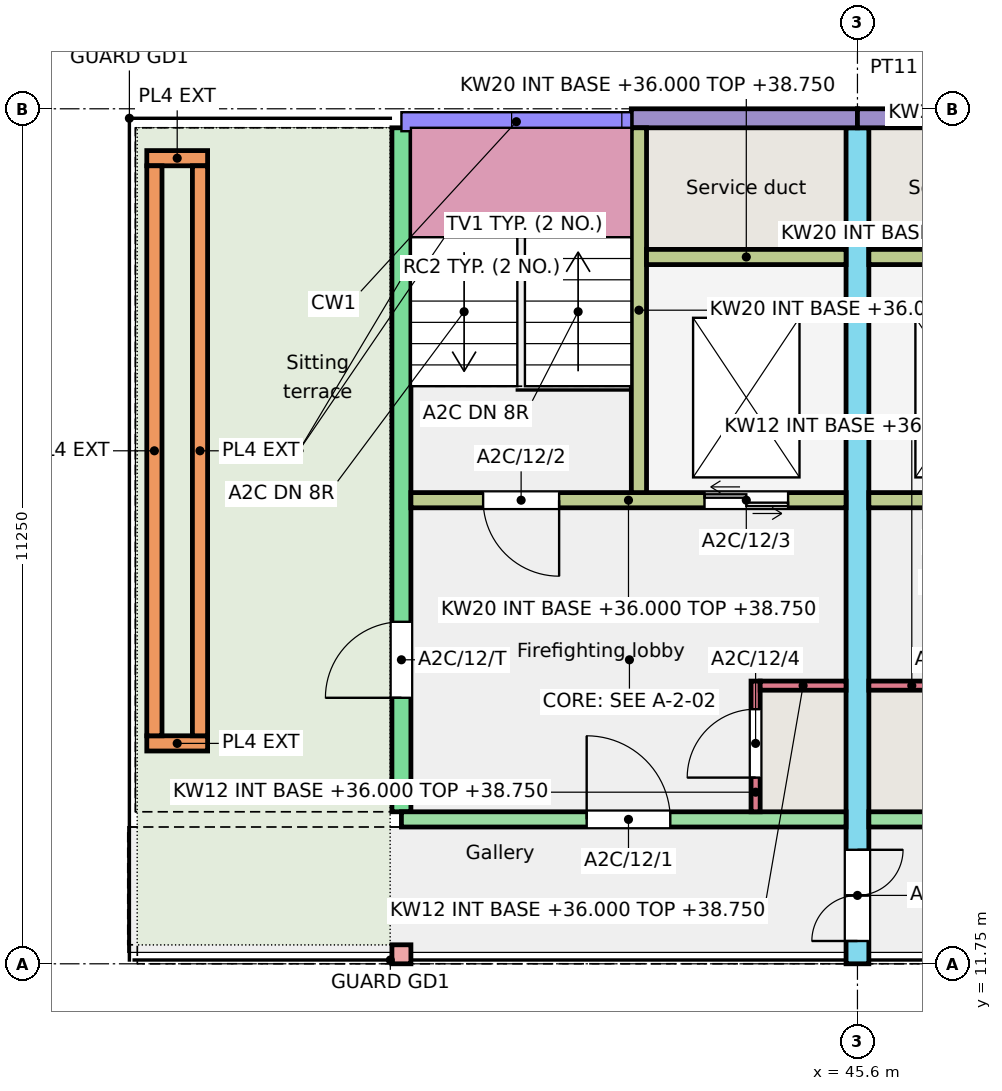
"""IFC4 building model, lengths in metres.
Left out: names, types, materials, properties, quantities, classifications, styles, units other than length and angle.
Written with IfcOpenShell. Run it as: python <this file> out.ifc"""

import sys

from ifc_helpers import new_model, si_unit, direction, frame, frame_2d, origin, origin_2d, place, context, subcontext, project, spatial, rectangle, extrude, element, fill, save


model = new_model("IFC4")
c1 = context("Model", 3, precision=1e-05, world=origin(), true_north=direction((0.0, 1.0)))
c2 = subcontext(c1, "Body", "Model", "MODEL_VIEW")
j1 = project(units=[si_unit("LENGTHUNIT", "METRE"), si_unit("PLANEANGLEUNIT", "RADIAN")], contexts=[c1])
p1 = place(None, origin())
s1 = spatial("IfcSite", under=j1, at=p1, CompositionType="ELEMENT")
p2 = place(p1, origin())
s2 = spatial("IfcBuilding", under=s1, at=p2, CompositionType="ELEMENT")
p3 = place(p2, frame((0.0, 0.0, 36.0)))
s3 = spatial("IfcBuildingStorey", under=s2, at=p3, CompositionType="ELEMENT", Elevation=36.0)
p4 = place(p3, frame((39.6, 13.75, 0.0), z_axis=(0.0, 0.0, 1.0), x_axis=(0.0, 1.0, 0.0)))
e1 = element("IfcWall", 1, at=p4, inside=s3, PredefinedType="SHEAR", context=c2, shape_type="SweptSolid", body=[
    extrude(rectangle(XDim=9.0, YDim=0.25, at=frame_2d((4.5, 0.0))), origin(), (0.0, 0.0, 1.0), 3.0),
])
p5 = place(p4, frame((1.5, 0.0, 0.0)))
e2 = element("IfcOpeningElement", 2, at=p5, cuts=e1, PredefinedType="OPENING", context=c2, shape_type="SweptSolid", body=[
    extrude(rectangle(XDim=1.0, YDim=2.1, at=frame_2d((0.5, 1.05))), frame((0.0, 0.135, 0.0), z_axis=(0.0, -1.0, 0.0), x_axis=(1.0, 0.0, 0.0)), (0.0, 0.0, 1.0), 0.27),
])
p6 = place(p3, frame((45.6, 11.75, 0.0), z_axis=(0.0, 0.0, 1.0), x_axis=(0.0, 1.0, 0.0)))
e3 = element("IfcWall", 3, at=p6, inside=s3, PredefinedType="SHEAR", context=c2, shape_type="SweptSolid", body=[
    extrude(rectangle(XDim=11.0, YDim=0.3, at=frame_2d((5.5, 0.0))), origin(), (0.0, 0.0, 1.0), 3.0),
])
p7 = place(p6, frame((0.3, 0.0, 0.0)))
e4 = element("IfcOpeningElement", 4, at=p7, cuts=e3, PredefinedType="OPENING", context=c2, shape_type="SweptSolid", body=[
    extrude(rectangle(XDim=1.2, YDim=2.1, at=frame_2d((0.6, 1.05))), frame((0.0, 0.16, 0.0), z_axis=(0.0, -1.0, 0.0), x_axis=(1.0, 0.0, 0.0)), (0.0, 0.0, 1.0), 0.32),
])
p8 = place(p3, frame((42.625, 22.875, 0.0), z_axis=(0.0, 0.0, 1.0), x_axis=(1.0, 0.0, 0.0)))
e5 = element("IfcWall", 5, at=p8, inside=s3, PredefinedType="SOLIDWALL", context=c2, shape_type="SweptSolid", body=[
    extrude(rectangle(XDim=2.975, YDim=0.25, at=frame_2d((1.488, 0.0))), origin(), (0.0, 0.0, 1.0), 3.0),
])
p9 = place(p3, frame((39.6, 13.65, 0.0), z_axis=(0.0, 0.0, 1.0), x_axis=(1.0, 0.0, 0.0)))
e6 = element("IfcWall", 6, at=p9, inside=s3, PredefinedType="SHEAR", context=c2, shape_type="SweptSolid", body=[
    extrude(rectangle(XDim=5.85, YDim=0.2, at=frame_2d((2.925, 0.0))), origin(), (0.0, 0.0, 1.0), 2.75),
])
p10 = place(p9, frame((2.438, 0.0, 0.0)))
e7 = element("IfcOpeningElement", 7, at=p10, cuts=e6, PredefinedType="OPENING", context=c2, shape_type="SweptSolid", body=[
    extrude(rectangle(XDim=1.1, YDim=2.1, at=frame_2d((0.55, 1.05))), frame((0.0, 0.11, 0.0), z_axis=(0.0, -1.0, 0.0), x_axis=(1.0, 0.0, 0.0)), (0.0, 0.0, 1.0), 0.22),
])
p11 = place(p3, frame((39.725, 17.85, 0.0), z_axis=(0.0, 0.0, 1.0), x_axis=(1.0, 0.0, 0.0)))
e8 = element("IfcWall", 8, at=p11, inside=s3, PredefinedType="SHEAR", context=c2, shape_type="SweptSolid", body=[
    extrude(rectangle(XDim=5.725, YDim=0.2, at=frame_2d((2.862, 0.0))), origin(), (0.0, 0.0, 1.0), 2.75),
])
p12 = place(p11, frame((0.95, 0.0, 0.0)))
e9 = element("IfcOpeningElement", 9, at=p12, cuts=e8, PredefinedType="OPENING", context=c2, shape_type="SweptSolid", body=[
    extrude(rectangle(XDim=1.0, YDim=2.1, at=frame_2d((0.5, 1.05))), frame((0.0, 0.11, 0.0), z_axis=(0.0, -1.0, 0.0), x_axis=(1.0, 0.0, 0.0)), (0.0, 0.0, 1.0), 0.22),
])
p13 = place(p11, frame((3.863, 0.0, 0.0)))
e10 = element("IfcOpeningElement", 10, at=p13, cuts=e8, PredefinedType="OPENING", context=c2, shape_type="SweptSolid", body=[
    extrude(rectangle(XDim=1.1, YDim=2.1, at=frame_2d((0.55, 1.05))), frame((0.0, 0.11, 0.0), z_axis=(0.0, -1.0, 0.0), x_axis=(1.0, 0.0, 0.0)), (0.0, 0.0, 1.0), 0.22),
])
p14 = place(p3, frame((42.725, 17.95, 0.0), z_axis=(0.0, 0.0, 1.0), x_axis=(0.0, 1.0, 0.0)))
e11 = element("IfcWall", 11, at=p14, inside=s3, PredefinedType="SHEAR", context=c2, shape_type="SweptSolid", body=[
    extrude(rectangle(XDim=4.8, YDim=0.2, at=frame_2d((2.4, 0.0))), origin(), (0.0, 0.0, 1.0), 2.75),
])
p15 = place(p3, frame((42.825, 21.05, 0.0), z_axis=(0.0, 0.0, 1.0), x_axis=(1.0, 0.0, 0.0)))
e12 = element("IfcWall", 12, at=p15, inside=s3, PredefinedType="SHEAR", context=c2, shape_type="SweptSolid", body=[
    extrude(rectangle(XDim=2.625, YDim=0.2, at=frame_2d((1.312, 0.0))), origin(), (0.0, 0.0, 1.0), 2.75),
])
p16 = place(p3, frame((44.26, 13.75, 0.0), z_axis=(0.0, 0.0, 1.0), x_axis=(0.0, 1.0, 0.0)))
e13 = element("IfcWall", 13, at=p16, inside=s3, PredefinedType="SHEAR", context=c2, shape_type="SweptSolid", body=[
    extrude(rectangle(XDim=1.72, YDim=0.12, at=frame_2d((0.86, 0.0))), origin(), (0.0, 0.0, 1.0), 2.75),
])
p17 = place(p16, frame((0.45, 0.0, 0.0)))
e14 = element("IfcOpeningElement", 14, at=p17, cuts=e13, PredefinedType="OPENING", context=c2, shape_type="SweptSolid", body=[
    extrude(rectangle(XDim=0.9, YDim=2.1, at=frame_2d((0.45, 1.05))), frame((0.0, 0.07, 0.0), z_axis=(0.0, -1.0, 0.0), x_axis=(1.0, 0.0, 0.0)), (0.0, 0.0, 1.0), 0.14),
])
p18 = place(p3, frame((44.32, 15.41, 0.0), z_axis=(0.0, 0.0, 1.0), x_axis=(1.0, 0.0, 0.0)))
e15 = element("IfcWall", 15, at=p18, inside=s3, PredefinedType="SHEAR", context=c2, shape_type="SweptSolid", body=[
    extrude(rectangle(XDim=1.13, YDim=0.12, at=frame_2d((0.565, 0.0))), origin(), (0.0, 0.0, 1.0), 2.75),
])
p19 = place(p3, frame((45.6, 22.875, 0.0), z_axis=(0.0, 0.0, 1.0), x_axis=(1.0, 0.0, 0.0)))
e16 = element("IfcWall", 16, at=p19, inside=s3, PredefinedType="SOLIDWALL", context=c2, shape_type="SweptSolid", body=[
    extrude(rectangle(XDim=2.975, YDim=0.25, at=frame_2d((1.487, 0.0))), origin(), (0.0, 0.0, 1.0), 3.0),
])
p20 = place(p3, frame((45.75, 13.65, 0.0), z_axis=(0.0, 0.0, 1.0), x_axis=(1.0, 0.0, 0.0)))
e17 = element("IfcWall", 17, at=p20, inside=s3, PredefinedType="SHEAR", context=c2, shape_type="SweptSolid", body=[
    extrude(rectangle(XDim=5.85, YDim=0.2, at=frame_2d((2.925, 0.0))), origin(), (0.0, 0.0, 1.0), 3.0),
])
p21 = place(p20, frame((2.312, 0.0, 0.0)))
e18 = element("IfcOpeningElement", 18, at=p21, cuts=e17, PredefinedType="OPENING", context=c2, shape_type="SweptSolid", body=[
    extrude(rectangle(XDim=1.1, YDim=2.1, at=frame_2d((0.55, 1.05))), frame((0.0, 0.11, 0.0), z_axis=(0.0, -1.0, 0.0), x_axis=(1.0, 0.0, 0.0)), (0.0, 0.0, 1.0), 0.22),
])
p22 = place(p3, frame((45.75, 17.85, 0.0), z_axis=(0.0, 0.0, 1.0), x_axis=(1.0, 0.0, 0.0)))
e19 = element("IfcWall", 19, at=p22, inside=s3, PredefinedType="SHEAR", context=c2, shape_type="SweptSolid", body=[
    extrude(rectangle(XDim=5.725, YDim=0.2, at=frame_2d((2.863, 0.0))), origin(), (0.0, 0.0, 1.0), 3.0),
])
p23 = place(p22, frame((3.775, 0.0, 0.0)))
e20 = element("IfcOpeningElement", 20, at=p23, cuts=e19, PredefinedType="OPENING", context=c2, shape_type="SweptSolid", body=[
    extrude(rectangle(XDim=1.0, YDim=2.1, at=frame_2d((0.5, 1.05))), frame((0.0, 0.11, 0.0), z_axis=(0.0, -1.0, 0.0), x_axis=(1.0, 0.0, 0.0)), (0.0, 0.0, 1.0), 0.22),
])
p24 = place(p22, frame((0.762, 0.0, 0.0)))
e21 = element("IfcOpeningElement", 21, at=p24, cuts=e19, PredefinedType="OPENING", context=c2, shape_type="SweptSolid", body=[
    extrude(rectangle(XDim=1.1, YDim=2.1, at=frame_2d((0.55, 1.05))), frame((0.0, 0.11, 0.0), z_axis=(0.0, -1.0, 0.0), x_axis=(1.0, 0.0, 0.0)), (0.0, 0.0, 1.0), 0.22),
])
p25 = place(p3, frame((45.75, 21.05, 0.0), z_axis=(0.0, 0.0, 1.0), x_axis=(1.0, 0.0, 0.0)))
e22 = element("IfcWall", 22, at=p25, inside=s3, PredefinedType="SHEAR", context=c2, shape_type="SweptSolid", body=[
    extrude(rectangle(XDim=2.625, YDim=0.2, at=frame_2d((1.312, 0.0))), origin(), (0.0, 0.0, 1.0), 3.0),
])
p26 = place(p3, frame((45.75, 15.41, 0.0), z_axis=(0.0, 0.0, 1.0), x_axis=(1.0, 0.0, 0.0)))
e23 = element("IfcWall", 23, at=p26, inside=s3, PredefinedType="SHEAR", context=c2, shape_type="SweptSolid", body=[
    extrude(rectangle(XDim=1.13, YDim=0.12, at=frame_2d((0.565, 0.0))), origin(), (0.0, 0.0, 1.0), 3.0),
])
p27 = place(p3, frame((39.6, 11.875, 0.0), z_axis=(0.0, 0.0, 1.0), x_axis=(1.0, 0.0, 0.0)))
e24 = element("IfcColumn", 24, at=p27, inside=s3, PredefinedType="COLUMN", context=c2, shape_type="SweptSolid", body=[
    extrude(rectangle(XDim=0.25, YDim=0.25, at=origin_2d()), origin(), (0.0, 0.0, 1.0), 3.0),
])
for number, where, z_axis, x_axis in (
    (25, (36.25, 14.65, 0.01), (0.0, 0.0, 1.0), (1.0, 0.0, 0.0)),
    (26, (36.25, 22.35, 0.01), (0.0, 0.0, 1.0), (1.0, 0.0, 0.0)),
):
    element("IfcWall", number, at=place(p3, frame(where, z_axis=z_axis, x_axis=x_axis)), inside=s3, PredefinedType="SOLIDWALL", context=c2, shape_type="SweptSolid", body=[
        extrude(rectangle(XDim=0.8, YDim=0.2, at=frame_2d((0.4, 0.0))), origin(), (0.0, 0.0, 1.0), 0.45),
    ])
for number, where, z_axis, x_axis in (
    (27, (36.35, 14.75, 0.01), (0.0, 0.0, 1.0), (0.0, 1.0, 0.0)),
    (28, (36.95, 14.75, 0.01), (0.0, 0.0, 1.0), (0.0, 1.0, 0.0)),
):
    element("IfcWall", number, at=place(p3, frame(where, z_axis=z_axis, x_axis=x_axis)), inside=s3, PredefinedType="SOLIDWALL", context=c2, shape_type="SweptSolid", body=[
        extrude(rectangle(XDim=7.5, YDim=0.2, at=frame_2d((3.75, 0.0))), origin(), (0.0, 0.0, 1.0), 0.45),
    ])
p28 = place(p10, origin())
e29 = element("IfcDoor", 29, at=p28, inside=s3, OperationType="SINGLE_SWING_LEFT", PredefinedType="DOOR", context=c2, shape_type="SweptSolid", body=[
    extrude(rectangle(XDim=1.1, YDim=2.1, at=frame_2d((0.55, 1.05))), frame((0.0, 0.025, 0.0), z_axis=(0.0, -1.0, 0.0), x_axis=(1.0, 0.0, 0.0)), (0.0, 0.0, 1.0), 0.05),
])
fill(e7, e29)
p29 = place(p12, origin())
e30 = element("IfcDoor", 30, at=p29, inside=s3, OperationType="SINGLE_SWING_RIGHT", PredefinedType="DOOR", context=c2, shape_type="SweptSolid", body=[
    extrude(rectangle(XDim=1.0, YDim=2.1, at=frame_2d((0.5, 1.05))), frame((0.0, 0.025, 0.0), z_axis=(0.0, -1.0, 0.0), x_axis=(1.0, 0.0, 0.0)), (0.0, 0.0, 1.0), 0.05),
])
fill(e9, e30)
p30 = place(p13, origin())
e31 = element("IfcDoor", 31, at=p30, inside=s3, OperationType="DOUBLE_DOOR_SLIDING", PredefinedType="DOOR", context=c2, shape_type="SweptSolid", body=[
    extrude(rectangle(XDim=1.1, YDim=2.1, at=frame_2d((0.55, 1.05))), frame((0.0, 0.025, 0.0), z_axis=(0.0, -1.0, 0.0), x_axis=(1.0, 0.0, 0.0)), (0.0, 0.0, 1.0), 0.05),
])
fill(e10, e31)
p31 = place(p17, origin())
e32 = element("IfcDoor", 32, at=p31, inside=s3, OperationType="SINGLE_SWING_LEFT", PredefinedType="DOOR", context=c2, shape_type="SweptSolid", body=[
    extrude(rectangle(XDim=0.9, YDim=2.1, at=frame_2d((0.45, 1.05))), frame((0.0, 0.025, 0.0), z_axis=(0.0, -1.0, 0.0), x_axis=(1.0, 0.0, 0.0)), (0.0, 0.0, 1.0), 0.05),
])
fill(e14, e32)
p32 = place(p5, origin())
e33 = element("IfcDoor", 33, at=p32, inside=s3, OperationType="SINGLE_SWING_LEFT", PredefinedType="DOOR", context=c2, shape_type="SweptSolid", body=[
    extrude(rectangle(XDim=1.0, YDim=2.1, at=frame_2d((0.5, 1.05))), frame((0.0, 0.025, 0.0), z_axis=(0.0, -1.0, 0.0), x_axis=(1.0, 0.0, 0.0)), (0.0, 0.0, 1.0), 0.05),
])
fill(e2, e33)
p33 = place(p7, origin())
e34 = element("IfcDoor", 34, at=p33, inside=s3, OperationType="DOUBLE_DOOR_SINGLE_SWING", PredefinedType="DOOR", context=c2, shape_type="SweptSolid", body=[
    extrude(rectangle(XDim=1.2, YDim=2.1, at=frame_2d((0.6, 1.05))), frame((0.0, 0.025, 0.0), z_axis=(0.0, -1.0, 0.0), x_axis=(1.0, 0.0, 0.0)), (0.0, 0.0, 1.0), 0.05),
])
fill(e4, e34)
save(model, sys.argv[1])
